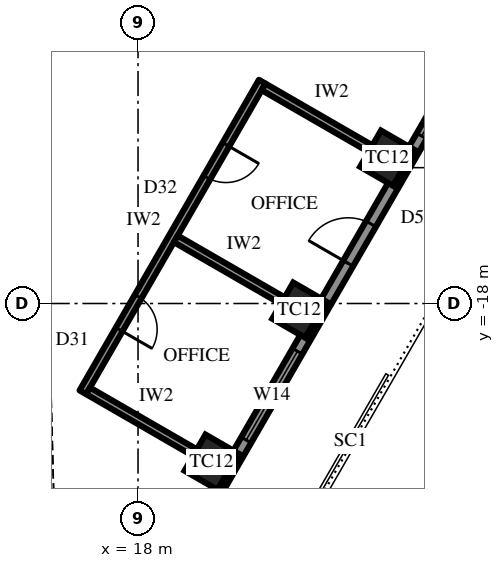
"""IFC4 building model, lengths in metres.
Left out: names, types, materials, properties, quantities, classifications, styles, units other than length and angle.
Written with IfcOpenShell. Run it as: python <this file> out.ifc"""

import sys

from ifc_helpers import new_model, si_unit, direction, frame, frame_2d, origin, origin_2d, place, context, subcontext, project, spatial, rectangle, extrude, element, fill, save


model = new_model("IFC4")
c1 = context("Model", 3, precision=1e-05, world=origin(), true_north=direction((0.0, 1.0)))
c2 = subcontext(c1, "Body", "Model", "MODEL_VIEW")
j1 = project(units=[si_unit("LENGTHUNIT", "METRE"), si_unit("PLANEANGLEUNIT", "RADIAN")], contexts=[c1])
p1 = place(None, origin())
s1 = spatial("IfcSite", under=j1, at=p1, CompositionType="ELEMENT")
p2 = place(p1, origin())
s2 = spatial("IfcBuilding", under=s1, at=p2, CompositionType="ELEMENT")
p3 = place(p2, frame((0.0, 0.0, 278.5)))
s3 = spatial("IfcBuildingStorey", under=s2, at=p3, CompositionType="ELEMENT", Elevation=278.5)
for number, where, z_axis, x_axis in (
    (1, (19.933, -22.175, 0.0), (0.0, 0.0, 1.0), (0.5, 0.866, 0.0)),
    (2, (22.242, -18.175, 0.0), (0.0, 0.0, 1.0), (0.5, 0.866, 0.0)),
    (3, (24.552, -14.175, 0.0), (0.0, 0.0, 1.0), (0.5, 0.866, 0.0)),
):
    element("IfcColumn", number, at=place(p3, frame(where, z_axis=z_axis, x_axis=x_axis)), inside=s3, PredefinedType="COLUMN", context=c2, shape_type="SweptSolid", body=[
        extrude(rectangle(XDim=1.1, YDim=1.0, at=origin_2d()), origin(), (0.0, 0.0, 1.0), 4.2),
    ])
p4 = place(p3, frame((18.707, -25.299, 0.0), z_axis=(0.0, 0.0, 1.0), x_axis=(0.500000442367, 0.866025148383, 0.0)))
e4 = element("IfcWall", 4, at=p4, inside=s3, PredefinedType="SOLIDWALL", context=c2, shape_type="SweptSolid", body=[
    extrude(rectangle(XDim=25.113, YDim=0.3, at=frame_2d((12.556, 0.0))), origin(), (0.0, 0.0, 1.0), 2.8),
])
p5 = place(p4, frame((4.278, 0.0, 0.6)))
e5 = element("IfcOpeningElement", 5, at=p5, cuts=e4, PredefinedType="OPENING", context=c2, shape_type="SweptSolid", body=[
    extrude(rectangle(XDim=2.7, YDim=1.95, at=frame_2d((1.35, 0.975))), frame((0.0, 0.16, 0.0), z_axis=(0.0, -1.0, 0.0), x_axis=(1.0, 0.0, 0.0)), (0.0, 0.0, 1.0), 0.32),
])
p6 = place(p4, frame((9.647, 0.0, 0.0)))
e6 = element("IfcOpeningElement", 6, at=p6, cuts=e4, PredefinedType="OPENING", context=c2, shape_type="SweptSolid", body=[
    extrude(rectangle(XDim=1.2, YDim=2.4, at=frame_2d((0.6, 1.2))), frame((0.0, 0.16, 0.0), z_axis=(0.0, -1.0, 0.0), x_axis=(1.0, 0.0, 0.0)), (0.0, 0.0, 1.0), 0.32),
])
p7 = place(p4, frame((13.516, 0.0, 0.6)))
e7 = element("IfcOpeningElement", 7, at=p7, cuts=e4, PredefinedType="OPENING", context=c2, shape_type="SweptSolid", body=[
    extrude(rectangle(XDim=2.7, YDim=1.95, at=frame_2d((1.35, 0.975))), frame((0.0, 0.16, 0.0), z_axis=(0.0, -1.0, 0.0), x_axis=(1.0, 0.0, 0.0)), (0.0, 0.0, 1.0), 0.32),
])
p8 = place(p4, frame((18.135, 0.0, 0.6)))
e8 = element("IfcOpeningElement", 8, at=p8, cuts=e4, PredefinedType="OPENING", context=c2, shape_type="SweptSolid", body=[
    extrude(rectangle(XDim=2.7, YDim=1.95, at=frame_2d((1.35, 0.975))), frame((0.0, 0.16, 0.0), z_axis=(0.0, -1.0, 0.0), x_axis=(1.0, 0.0, 0.0)), (0.0, 0.0, 1.0), 0.32),
])
p9 = place(p3, frame((16.549, -20.337, 0.0), z_axis=(0.0, 0.0, 1.0), x_axis=(0.499989672313, 0.866031366395, 0.0)))
e9 = element("IfcWall", 9, at=p9, inside=s3, PredefinedType="PARTITIONING", context=c2, shape_type="SweptSolid", body=[
    extrude(rectangle(XDim=9.438, YDim=0.2, at=frame_2d((4.719, 0.0))), origin(), (0.0, 0.0, 1.0), 4.0),
])
p10 = place(p9, frame((1.909, 0.0, 0.0)))
e10 = element("IfcOpeningElement", 10, at=p10, cuts=e9, PredefinedType="OPENING", context=c2, shape_type="SweptSolid", body=[
    extrude(rectangle(XDim=1.0, YDim=2.2, at=frame_2d((0.5, 1.1))), frame((0.0, 0.11, 0.0), z_axis=(0.0, -1.0, 0.0), x_axis=(1.0, 0.0, 0.0)), (0.0, 0.0, 1.0), 0.22),
])
p11 = place(p9, frame((6.528, 0.0, 0.0)))
e11 = element("IfcOpeningElement", 11, at=p11, cuts=e9, PredefinedType="OPENING", context=c2, shape_type="SweptSolid", body=[
    extrude(rectangle(XDim=1.0, YDim=2.2, at=frame_2d((0.5, 1.1))), frame((0.0, 0.11, 0.0), z_axis=(0.0, -1.0, 0.0), x_axis=(1.0, 0.0, 0.0)), (0.0, 0.0, 1.0), 0.22),
])
for number, where, z_axis, x_axis in (
    (12, (16.685, -20.3, 0.0), (0.0, 0.0, 1.0), (0.866, -0.5, 0.0)),
    (13, (18.995, -16.3, 0.0), (0.0, 0.0, 1.0), (0.866, -0.5, 0.0)),
    (14, (21.304, -12.3, 0.0), (0.0, 0.0, 1.0), (0.866, -0.5, 0.0)),
):
    element("IfcWall", number, at=place(p3, frame(where, z_axis=z_axis, x_axis=x_axis)), inside=s3, PredefinedType="PARTITIONING", context=c2, shape_type="SweptSolid", body=[
        extrude(rectangle(XDim=3.25, YDim=0.2, at=frame_2d((1.625, 0.0))), origin(), (0.0, 0.0, 1.0), 3.082),
    ])
p12 = place(p5, origin())
e15 = element("IfcWindow", 15, at=p12, inside=s3, PartitioningType="SINGLE_PANEL", PredefinedType="WINDOW", context=c2, shape_type="SweptSolid", body=[
    extrude(rectangle(XDim=2.7, YDim=1.95, at=frame_2d((1.35, 0.975))), frame((0.0, 0.03, 0.0), z_axis=(0.0, -1.0, 0.0), x_axis=(1.0, 0.0, 0.0)), (0.0, 0.0, 1.0), 0.06),
])
fill(e5, e15)
p13 = place(p6, origin())
e16 = element("IfcDoor", 16, at=p13, inside=s3, OperationType="SINGLE_SWING_RIGHT", PredefinedType="DOOR", context=c2, shape_type="SweptSolid", body=[
    extrude(rectangle(XDim=1.2, YDim=2.4, at=frame_2d((0.6, 1.2))), frame((0.0, 0.025, 0.0), z_axis=(0.0, -1.0, 0.0), x_axis=(1.0, 0.0, 0.0)), (0.0, 0.0, 1.0), 0.05),
])
fill(e6, e16)
p14 = place(p7, origin())
e17 = element("IfcWindow", 17, at=p14, inside=s3, PartitioningType="SINGLE_PANEL", PredefinedType="WINDOW", context=c2, shape_type="SweptSolid", body=[
    extrude(rectangle(XDim=2.7, YDim=1.95, at=frame_2d((1.35, 0.975))), frame((0.0, 0.03, 0.0), z_axis=(0.0, -1.0, 0.0), x_axis=(1.0, 0.0, 0.0)), (0.0, 0.0, 1.0), 0.06),
])
fill(e7, e17)
p15 = place(p10, frame((1.0, 0.0, 0.0), z_axis=(0.0, 0.0, 1.0), x_axis=(-1.0, 0.0, 0.0)))
e18 = element("IfcDoor", 18, at=p15, inside=s3, OperationType="SINGLE_SWING_LEFT", PredefinedType="DOOR", context=c2, shape_type="SweptSolid", body=[
    extrude(rectangle(XDim=1.0, YDim=2.2, at=frame_2d((0.5, 1.1))), frame((0.0, 0.025, 0.0), z_axis=(0.0, -1.0, 0.0), x_axis=(1.0, 0.0, 0.0)), (0.0, 0.0, 1.0), 0.05),
])
fill(e10, e18)
p16 = place(p11, frame((1.0, 0.0, 0.0), z_axis=(0.0, 0.0, 1.0), x_axis=(-1.0, 0.0, 0.0)))
e19 = element("IfcDoor", 19, at=p16, inside=s3, OperationType="SINGLE_SWING_RIGHT", PredefinedType="DOOR", context=c2, shape_type="SweptSolid", body=[
    extrude(rectangle(XDim=1.0, YDim=2.2, at=frame_2d((0.5, 1.1))), frame((0.0, 0.025, 0.0), z_axis=(0.0, -1.0, 0.0), x_axis=(1.0, 0.0, 0.0)), (0.0, 0.0, 1.0), 0.05),
])
fill(e11, e19)
save(model, sys.argv[1])
